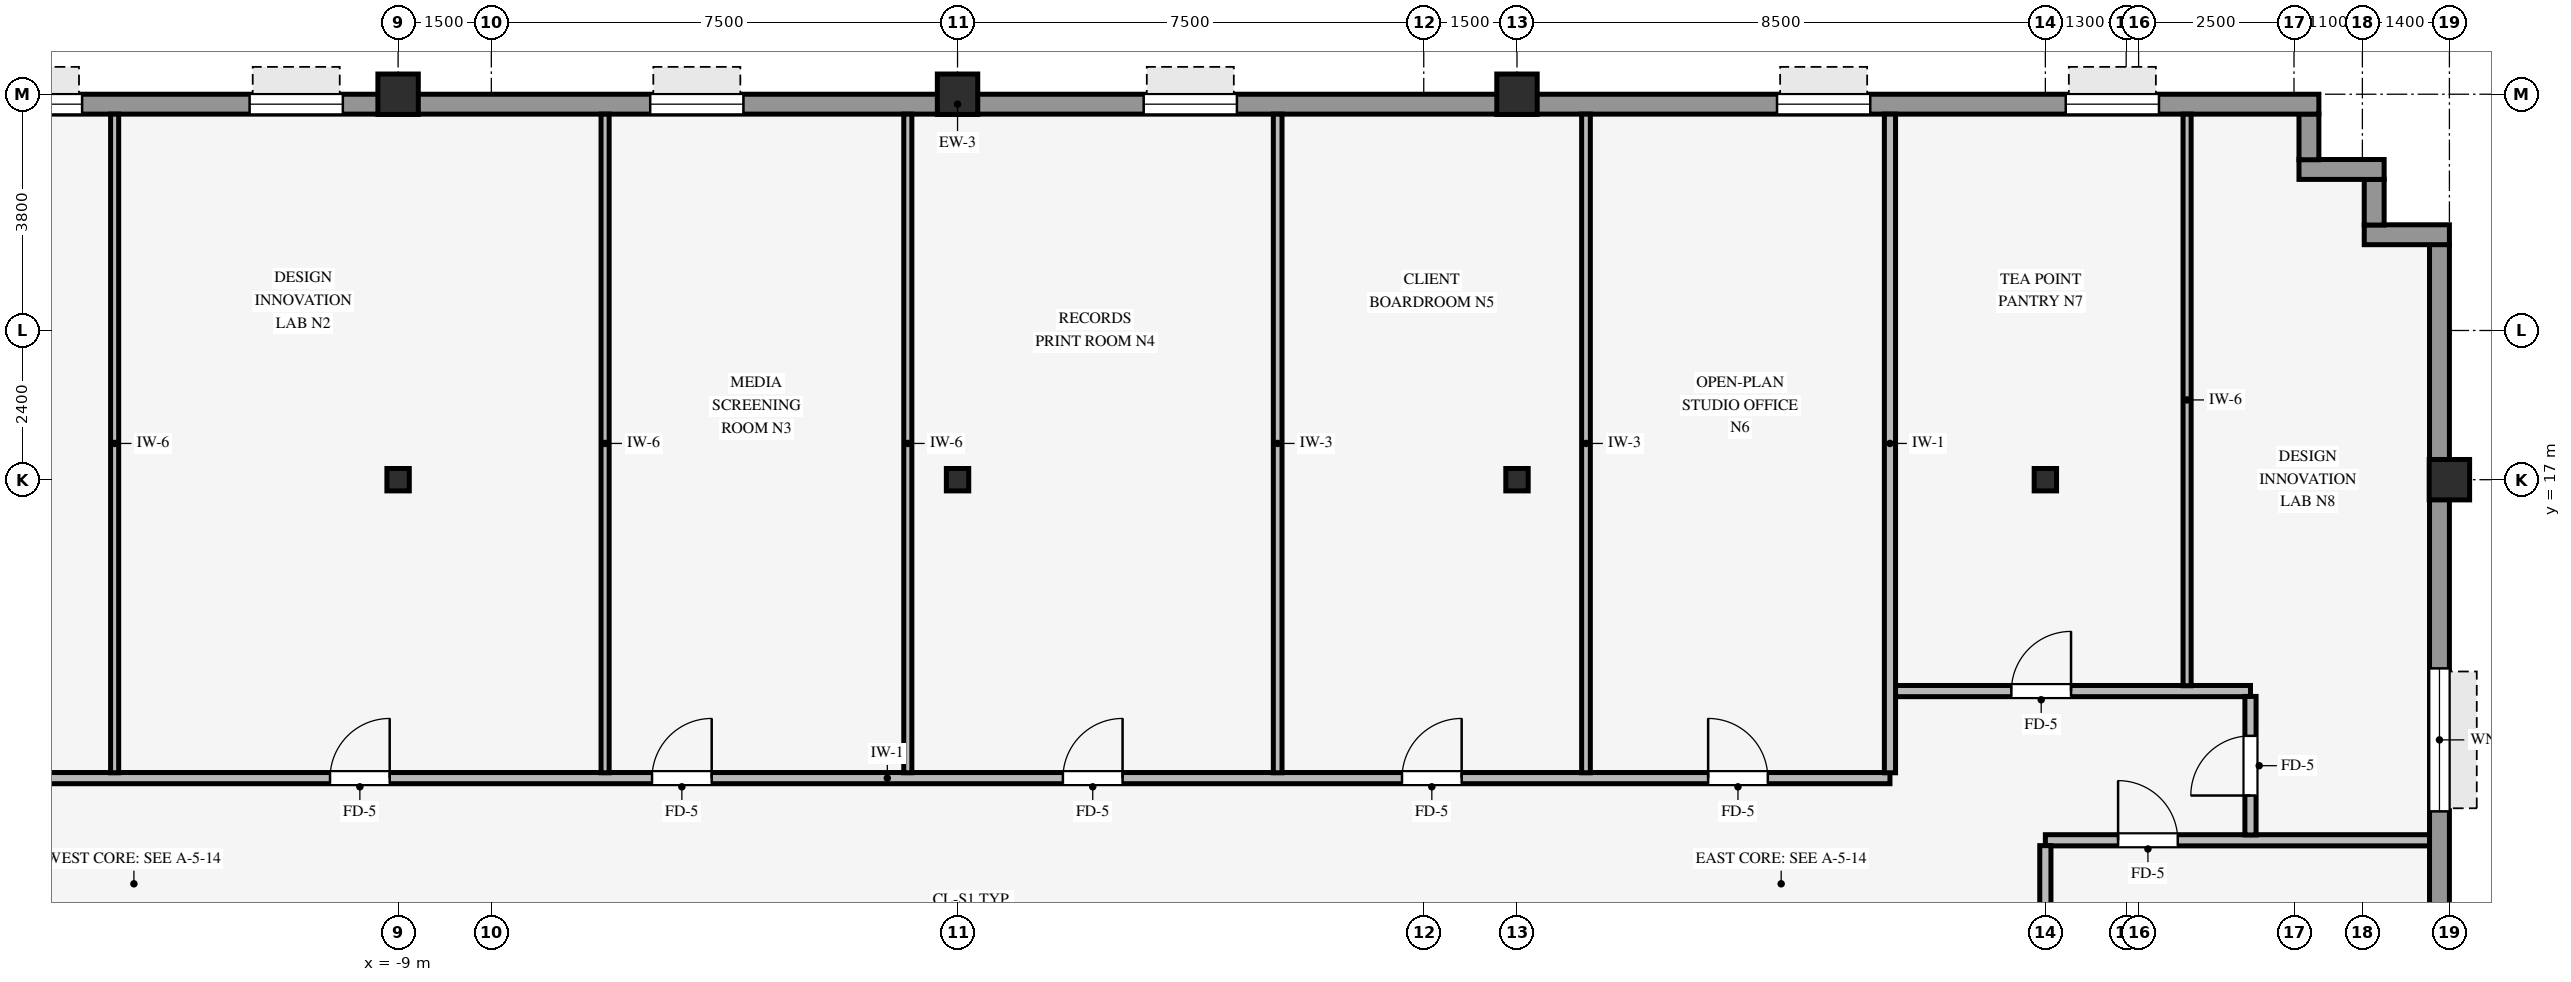
"""IFC4 building model, lengths in metres.
Left out: names, types, materials, properties, quantities, classifications, styles, units other than length and angle.
Written with IfcOpenShell. Run it as: python <this file> out.ifc"""

import sys

from ifc_helpers import new_model, si_unit, direction, frame, frame_2d, origin, origin_2d, place, context, subcontext, project, spatial, rectangle, hollow_rectangle, i_section, extrude, source, transform, mapped, element, fill, save


model = new_model("IFC4")
c1 = context("Model", 3, precision=1e-05, world=origin(), true_north=direction((0.0, 1.0)))
c2 = subcontext(c1, "Body", "Model", "MODEL_VIEW")
j1 = project(units=[si_unit("LENGTHUNIT", "METRE"), si_unit("PLANEANGLEUNIT", "RADIAN")], contexts=[c1])
p1 = place(None, origin())
s1 = spatial("IfcSite", under=j1, at=p1, CompositionType="ELEMENT")
p2 = place(p1, origin())
s2 = spatial("IfcBuilding", under=s1, at=p2, CompositionType="ELEMENT")
p3 = place(p2, frame((0.0, 0.0, 112.9)))
s3 = spatial("IfcBuildingStorey", under=s2, at=p3, CompositionType="ELEMENT", Elevation=112.9)
for number, where, z_axis, x_axis in (
    (1, (24.0, 17.0, 0.0), (0.0, 0.0, 1.0), (1.0, 0.0, 0.0)),
    (2, (-9.0, 23.2, 0.0), (0.0, 0.0, 1.0), (1.0, 0.0, 0.0)),
    (3, (0.0, 23.2, 0.0), (0.0, 0.0, 1.0), (1.0, 0.0, 0.0)),
    (4, (9.0, 23.2, 0.0), (0.0, 0.0, 1.0), (1.0, 0.0, 0.0)),
):
    element("IfcColumn", number, at=place(p3, frame(where, z_axis=z_axis, x_axis=x_axis)), inside=s3, PredefinedType="COLUMN", context=c2, shape_type="SweptSolid", body=[
        extrude(hollow_rectangle(XDim=0.65, YDim=0.65, WallThickness=0.04, InnerFilletRadius=0.04, OuterFilletRadius=0.08, at=origin_2d()), origin(), (0.0, 0.0, 1.0), 3.25),
    ])
for number, where, z_axis, x_axis in (
    (5, (0.0, 17.0, 0.0), (0.0, 0.0, 1.0), (1.0, 0.0, 0.0)),
    (6, (-9.0, 17.0, 0.0), (0.0, 0.0, 1.0), (1.0, 0.0, 0.0)),
    (7, (9.0, 17.0, 0.0), (0.0, 0.0, 1.0), (1.0, 0.0, 0.0)),
    (8, (17.5, 17.0, 0.0), (0.0, 0.0, 1.0), (1.0, 0.0, 0.0)),
):
    element("IfcColumn", number, at=place(p3, frame(where, z_axis=z_axis, x_axis=x_axis)), inside=s3, PredefinedType="COLUMN", context=c2, shape_type="SweptSolid", body=[
        extrude(i_section(OverallWidth=0.36, OverallDepth=0.36, WebThickness=0.021, FlangeThickness=0.021, FilletRadius=0.018, at=origin_2d()), origin(), (0.0, 0.0, 1.0), 3.25),
    ])
p4 = place(p3, frame((23.84, -20.784, 0.0), z_axis=(0.0, 0.0, 1.0), x_axis=(0.0, 1.0, 0.0)))
e9 = element("IfcWall", 9, at=p4, inside=s3, PredefinedType="STANDARD", context=c2, shape_type="SweptSolid", body=[
    extrude(rectangle(XDim=41.568, YDim=0.32, at=frame_2d((20.784, 0.0))), origin(), (0.0, 0.0, 1.0), 3.24),
])
p5 = place(p4, frame((6.819, 0.0, 0.8)))
e10 = element("IfcOpeningElement", 10, at=p5, cuts=e9, PredefinedType="OPENING", context=c2, shape_type="SweptSolid", body=[
    extrude(rectangle(XDim=2.3, YDim=1.62, at=frame_2d((1.15, 0.81))), frame((0.0, 0.17, 0.0), z_axis=(0.0, -1.0, 0.0), x_axis=(1.0, 0.0, 0.0)), (0.0, 0.0, 1.0), 0.34),
])
p6 = place(p4, frame((17.161, 0.0, 0.8)))
e11 = element("IfcOpeningElement", 11, at=p6, cuts=e9, PredefinedType="OPENING", context=c2, shape_type="SweptSolid", body=[
    extrude(rectangle(XDim=2.3, YDim=1.62, at=frame_2d((1.15, 0.81))), frame((0.0, 0.17, 0.0), z_axis=(0.0, -1.0, 0.0), x_axis=(1.0, 0.0, 0.0)), (0.0, 0.0, 1.0), 0.34),
])
p7 = place(p4, frame((22.107, 0.0, 0.8)))
e12 = element("IfcOpeningElement", 12, at=p7, cuts=e9, PredefinedType="OPENING", context=c2, shape_type="SweptSolid", body=[
    extrude(rectangle(XDim=2.3, YDim=1.62, at=frame_2d((1.15, 0.81))), frame((0.0, 0.17, 0.0), z_axis=(0.0, -1.0, 0.0), x_axis=(1.0, 0.0, 0.0)), (0.0, 0.0, 1.0), 0.34),
])
p8 = place(p4, frame((32.449, 0.0, 0.8)))
e13 = element("IfcOpeningElement", 13, at=p8, cuts=e9, PredefinedType="OPENING", context=c2, shape_type="SweptSolid", body=[
    extrude(rectangle(XDim=2.3, YDim=1.62, at=frame_2d((1.15, 0.81))), frame((0.0, 0.17, 0.0), z_axis=(0.0, -1.0, 0.0), x_axis=(1.0, 0.0, 0.0)), (0.0, 0.0, 1.0), 0.34),
])
p9 = place(p3, frame((22.63, 20.94, 0.0), z_axis=(0.0, 0.0, 1.0), x_axis=(1.0, 0.0, 0.0)))
e14 = element("IfcWall", 14, at=p9, inside=s3, PredefinedType="STANDARD", context=c2, shape_type="SweptSolid", body=[
    extrude(rectangle(XDim=1.37, YDim=0.32, at=frame_2d((0.685, 0.0))), origin(), (0.0, 0.0, 1.0), 3.24),
])
p10 = place(p3, frame((22.79, 21.096, 0.0), z_axis=(0.0, 0.0, 1.0), x_axis=(0.0, 1.0, 0.0)))
e15 = element("IfcWall", 15, at=p10, inside=s3, PredefinedType="STANDARD", context=c2, shape_type="SweptSolid", body=[
    extrude(rectangle(XDim=0.738, YDim=0.32, at=frame_2d((0.369, 0.0))), origin(), (0.0, 0.0, 1.0), 3.24),
])
p11 = place(p3, frame((21.58, 21.99, 0.0), z_axis=(0.0, 0.0, 1.0), x_axis=(1.0, 0.0, 0.0)))
e16 = element("IfcWall", 16, at=p11, inside=s3, PredefinedType="STANDARD", context=c2, shape_type="SweptSolid", body=[
    extrude(rectangle(XDim=1.37, YDim=0.32, at=frame_2d((0.685, 0.0))), origin(), (0.0, 0.0, 1.0), 3.24),
])
p12 = place(p3, frame((21.74, 22.146, 0.0), z_axis=(0.0, 0.0, 1.0), x_axis=(0.0, 1.0, 0.0)))
e17 = element("IfcWall", 17, at=p12, inside=s3, PredefinedType="STANDARD", context=c2, shape_type="SweptSolid", body=[
    extrude(rectangle(XDim=0.738, YDim=0.32, at=frame_2d((0.369, 0.0))), origin(), (0.0, 0.0, 1.0), 3.24),
])
p13 = place(p3, frame((-21.9, 23.04, 0.0), z_axis=(0.0, 0.0, 1.0), x_axis=(1.0, 0.0, 0.0)))
e18 = element("IfcWall", 18, at=p13, inside=s3, PredefinedType="STANDARD", context=c2, shape_type="SweptSolid", body=[
    extrude(rectangle(XDim=43.8, YDim=0.32, at=frame_2d((21.9, 0.0))), origin(), (0.0, 0.0, 1.0), 2.585),
])
p14 = place(p13, frame((2.572, 0.0, 0.8)))
e19 = element("IfcOpeningElement", 19, at=p14, cuts=e18, PredefinedType="OPENING", context=c2, shape_type="SweptSolid", body=[
    extrude(rectangle(XDim=1.5, YDim=1.6, at=frame_2d((0.75, 0.8))), frame((0.0, 0.17, 0.0), z_axis=(0.0, -1.0, 0.0), x_axis=(1.0, 0.0, 0.0)), (0.0, 0.0, 1.0), 0.34),
])
p15 = place(p13, frame((6.317, 0.0, 0.8)))
e20 = element("IfcOpeningElement", 20, at=p15, cuts=e18, PredefinedType="OPENING", context=c2, shape_type="SweptSolid", body=[
    extrude(rectangle(XDim=1.5, YDim=1.6, at=frame_2d((0.75, 0.8))), frame((0.0, 0.17, 0.0), z_axis=(0.0, -1.0, 0.0), x_axis=(1.0, 0.0, 0.0)), (0.0, 0.0, 1.0), 0.34),
])
p16 = place(p13, frame((10.511, 0.0, 0.8)))
e21 = element("IfcOpeningElement", 21, at=p16, cuts=e18, PredefinedType="OPENING", context=c2, shape_type="SweptSolid", body=[
    extrude(rectangle(XDim=1.5, YDim=1.6, at=frame_2d((0.75, 0.8))), frame((0.0, 0.17, 0.0), z_axis=(0.0, -1.0, 0.0), x_axis=(1.0, 0.0, 0.0)), (0.0, 0.0, 1.0), 0.34),
])
p17 = place(p13, frame((16.956, 0.0, 0.8)))
e22 = element("IfcOpeningElement", 22, at=p17, cuts=e18, PredefinedType="OPENING", context=c2, shape_type="SweptSolid", body=[
    extrude(rectangle(XDim=1.5, YDim=1.6, at=frame_2d((0.75, 0.8))), frame((0.0, 0.17, 0.0), z_axis=(0.0, -1.0, 0.0), x_axis=(1.0, 0.0, 0.0)), (0.0, 0.0, 1.0), 0.34),
])
p18 = place(p13, frame((24.894, 0.0, 0.8)))
e23 = element("IfcOpeningElement", 23, at=p18, cuts=e18, PredefinedType="OPENING", context=c2, shape_type="SweptSolid", body=[
    extrude(rectangle(XDim=1.5, YDim=1.6, at=frame_2d((0.75, 0.8))), frame((0.0, 0.17, 0.0), z_axis=(0.0, -1.0, 0.0), x_axis=(1.0, 0.0, 0.0)), (0.0, 0.0, 1.0), 0.34),
])
p19 = place(p13, frame((35.083, 0.0, 0.8)))
e24 = element("IfcOpeningElement", 24, at=p19, cuts=e18, PredefinedType="OPENING", context=c2, shape_type="SweptSolid", body=[
    extrude(rectangle(XDim=1.5, YDim=1.6, at=frame_2d((0.75, 0.8))), frame((0.0, 0.17, 0.0), z_axis=(0.0, -1.0, 0.0), x_axis=(1.0, 0.0, 0.0)), (0.0, 0.0, 1.0), 0.34),
])
p20 = place(p13, frame((39.728, 0.0, 0.8)))
e25 = element("IfcOpeningElement", 25, at=p20, cuts=e18, PredefinedType="OPENING", context=c2, shape_type="SweptSolid", body=[
    extrude(rectangle(XDim=1.5, YDim=1.6, at=frame_2d((0.75, 0.8))), frame((0.0, 0.17, 0.0), z_axis=(0.0, -1.0, 0.0), x_axis=(1.0, 0.0, 0.0)), (0.0, 0.0, 1.0), 0.34),
])
p21 = place(p3, frame((17.5, 11.2, 0.0), z_axis=(0.0, 0.0, 1.0), x_axis=(1.0, 0.0, 0.0)))
e26 = element("IfcWall", 26, at=p21, inside=s3, PredefinedType="PARTITIONING", context=c2, shape_type="SweptSolid", body=[
    extrude(rectangle(XDim=6.18, YDim=0.18, at=frame_2d((3.09, 0.0))), origin(), (0.0, 0.0, 1.0), 3.24),
])
p22 = place(p21, frame((1.17, 0.0, 0.0)))
e27 = element("IfcOpeningElement", 27, at=p22, cuts=e26, PredefinedType="OPENING", context=c2, shape_type="SweptSolid", body=[
    extrude(rectangle(XDim=0.96, YDim=2.1, at=frame_2d((0.48, 1.05))), frame((0.0, 0.1, 0.0), z_axis=(0.0, -1.0, 0.0), x_axis=(1.0, 0.0, 0.0)), (0.0, 0.0, 1.0), 0.2),
])
p23 = place(p3, frame((-15.0, 12.2, 0.0), z_axis=(0.0, 0.0, 1.0), x_axis=(1.0, 0.0, 0.0)))
e28 = element("IfcWall", 28, at=p23, inside=s3, PredefinedType="PARTITIONING", context=c2, shape_type="SweptSolid", body=[
    extrude(rectangle(XDim=30.0, YDim=0.18, at=frame_2d((15.0, 0.0))), origin(), (0.0, 0.0, 1.0), 3.24),
])
p24 = place(p23, frame((4.905, 0.0, 0.0)))
e29 = element("IfcOpeningElement", 29, at=p24, cuts=e28, PredefinedType="OPENING", context=c2, shape_type="SweptSolid", body=[
    extrude(rectangle(XDim=0.96, YDim=2.1, at=frame_2d((0.48, 1.05))), frame((0.0, 0.1, 0.0), z_axis=(0.0, -1.0, 0.0), x_axis=(1.0, 0.0, 0.0)), (0.0, 0.0, 1.0), 0.2),
])
p25 = place(p23, frame((16.695, 0.0, 0.0)))
e30 = element("IfcOpeningElement", 30, at=p25, cuts=e28, PredefinedType="OPENING", context=c2, shape_type="SweptSolid", body=[
    extrude(rectangle(XDim=0.96, YDim=2.1, at=frame_2d((0.48, 1.05))), frame((0.0, 0.1, 0.0), z_axis=(0.0, -1.0, 0.0), x_axis=(1.0, 0.0, 0.0)), (0.0, 0.0, 1.0), 0.2),
])
p26 = place(p23, frame((22.15, 0.0, 0.0)))
e31 = element("IfcOpeningElement", 31, at=p26, cuts=e28, PredefinedType="OPENING", context=c2, shape_type="SweptSolid", body=[
    extrude(rectangle(XDim=0.96, YDim=2.1, at=frame_2d((0.48, 1.05))), frame((0.0, 0.1, 0.0), z_axis=(0.0, -1.0, 0.0), x_axis=(1.0, 0.0, 0.0)), (0.0, 0.0, 1.0), 0.2),
])
p27 = place(p23, frame((27.075, 0.0, 0.0)))
e32 = element("IfcOpeningElement", 32, at=p27, cuts=e28, PredefinedType="OPENING", context=c2, shape_type="SweptSolid", body=[
    extrude(rectangle(XDim=0.96, YDim=2.1, at=frame_2d((0.48, 1.05))), frame((0.0, 0.1, 0.0), z_axis=(0.0, -1.0, 0.0), x_axis=(1.0, 0.0, 0.0)), (0.0, 0.0, 1.0), 0.2),
])
p28 = place(p23, frame((10.085, 0.0, 0.0)))
e33 = element("IfcOpeningElement", 33, at=p28, cuts=e28, PredefinedType="OPENING", context=c2, shape_type="SweptSolid", body=[
    extrude(rectangle(XDim=0.96, YDim=2.1, at=frame_2d((0.48, 1.05))), frame((0.0, 0.1, 0.0), z_axis=(0.0, -1.0, 0.0), x_axis=(1.0, 0.0, 0.0)), (0.0, 0.0, 1.0), 0.2),
])
p29 = place(p3, frame((15.086, 13.6, 0.0), z_axis=(0.0, 0.0, 1.0), x_axis=(1.0, 0.0, 0.0)))
e34 = element("IfcWall", 34, at=p29, inside=s3, PredefinedType="PARTITIONING", context=c2, shape_type="SweptSolid", body=[
    extrude(rectangle(XDim=5.714, YDim=0.18, at=frame_2d((2.857, 0.0))), origin(), (0.0, 0.0, 1.0), 2.878),
])
p30 = place(p29, frame((1.867, 0.0, 0.0)))
e35 = element("IfcOpeningElement", 35, at=p30, cuts=e34, PredefinedType="OPENING", context=c2, shape_type="SweptSolid", body=[
    extrude(rectangle(XDim=0.96, YDim=2.1, at=frame_2d((0.48, 1.05))), frame((0.0, 0.1, 0.0), z_axis=(0.0, -1.0, 0.0), x_axis=(1.0, 0.0, 0.0)), (0.0, 0.0, 1.0), 0.2),
])
for number, where, z_axis, x_axis in (
    (36, (-13.56, 12.286, 0.0), (0.0, 0.0, 1.0), (0.0, 1.0, 0.0)),
    (37, (-5.67, 12.286, 0.0), (0.0, 0.0, 1.0), (0.0, 1.0, 0.0)),
    (38, (-0.8, 12.286, 0.0), (0.0, 0.0, 1.0), (0.0, 1.0, 0.0)),
):
    element("IfcWall", number, at=place(p3, frame(where, z_axis=z_axis, x_axis=x_axis)), inside=s3, PredefinedType="PARTITIONING", context=c2, shape_type="SweptSolid", body=[
        extrude(rectangle(XDim=10.594, YDim=0.13, at=frame_2d((5.297, 0.0))), origin(), (0.0, 0.0, 1.0), 3.24),
    ])
for number, where, z_axis, x_axis in (
    (39, (5.15, 12.286, 0.0), (0.0, 0.0, 1.0), (0.0, 1.0, 0.0)),
    (40, (10.11, 12.286, 0.0), (0.0, 0.0, 1.0), (0.0, 1.0, 0.0)),
):
    element("IfcWall", number, at=place(p3, frame(where, z_axis=z_axis, x_axis=x_axis)), inside=s3, PredefinedType="PARTITIONING", context=c2, shape_type="SweptSolid", body=[
        extrude(rectangle(XDim=10.594, YDim=0.14, at=frame_2d((5.297, 0.0))), origin(), (0.0, 0.0, 1.0), 3.24),
    ])
p31 = place(p3, frame((15.0, 12.286, 0.0), z_axis=(0.0, 0.0, 1.0), x_axis=(0.0, 1.0, 0.0)))
e41 = element("IfcWall", 41, at=p31, inside=s3, PredefinedType="PARTITIONING", context=c2, shape_type="SweptSolid", body=[
    extrude(rectangle(XDim=10.594, YDim=0.18, at=frame_2d((5.297, 0.0))), origin(), (0.0, 0.0, 1.0), 3.24),
])
p32 = place(p3, frame((17.5, 10.146, 0.0), z_axis=(0.0, 0.0, 1.0), x_axis=(0.0, 1.0, 0.0)))
e42 = element("IfcWall", 42, at=p32, inside=s3, PredefinedType="PARTITIONING", context=c2, shape_type="SweptSolid", body=[
    extrude(rectangle(XDim=0.968, YDim=0.18, at=frame_2d((0.484, 0.0))), origin(), (0.0, 0.0, 1.0), 2.618),
])
p33 = place(p3, frame((19.78, 13.686, 0.0), z_axis=(0.0, 0.0, 1.0), x_axis=(0.0, 1.0, 0.0)))
e43 = element("IfcWall", 43, at=p33, inside=s3, PredefinedType="PARTITIONING", context=c2, shape_type="SweptSolid", body=[
    extrude(rectangle(XDim=9.194, YDim=0.13, at=frame_2d((4.597, 0.0))), origin(), (0.0, 0.0, 1.0), 3.24),
])
p34 = place(p3, frame((20.8, 11.286, 0.0), z_axis=(0.0, 0.0, 1.0), x_axis=(0.0, 1.0, 0.0)))
e44 = element("IfcWall", 44, at=p34, inside=s3, PredefinedType="PARTITIONING", context=c2, shape_type="SweptSolid", body=[
    extrude(rectangle(XDim=2.228, YDim=0.18, at=frame_2d((1.114, 0.0))), origin(), (0.0, 0.0, 1.0), 3.24),
])
p35 = place(p34, frame((0.634, 0.0, 0.0)))
e45 = element("IfcOpeningElement", 45, at=p35, cuts=e44, PredefinedType="OPENING", context=c2, shape_type="SweptSolid", body=[
    extrude(rectangle(XDim=0.96, YDim=2.1, at=frame_2d((0.48, 1.05))), frame((0.0, 0.1, 0.0), z_axis=(0.0, -1.0, 0.0), x_axis=(1.0, 0.0, 0.0)), (0.0, 0.0, 1.0), 0.2),
])
m1 = source(origin(), c2, "Body", "SweptSolid", [
    extrude(rectangle(XDim=2.3, YDim=1.62, at=frame_2d((1.15, 0.81))), frame((0.0, 0.03, 0.0), z_axis=(0.0, -1.0, 0.0), x_axis=(1.0, 0.0, 0.0)), (0.0, 0.0, 1.0), 0.06),
])
p36 = place(p8, origin())
e46 = element("IfcWindow", 46, at=p36, inside=s3, PartitioningType="SINGLE_PANEL", PredefinedType="WINDOW", context=c2, shape_type="MappedRepresentation", body=[
    mapped(m1, transform((0.0, 0.0, 0.0), scale=1.0)),
])
fill(e13, e46)
m2 = source(origin(), c2, "Body", "SweptSolid", [
    extrude(rectangle(XDim=1.5, YDim=1.6, at=frame_2d((0.75, 0.8))), frame((0.0, 0.03, 0.0), z_axis=(0.0, -1.0, 0.0), x_axis=(1.0, 0.0, 0.0)), (0.0, 0.0, 1.0), 0.06),
])
p37 = place(p15, origin())
e47 = element("IfcWindow", 47, at=p37, inside=s3, PartitioningType="SINGLE_PANEL", PredefinedType="WINDOW", context=c2, shape_type="MappedRepresentation", body=[
    mapped(m2, transform((0.0, 0.0, 0.0), scale=1.0)),
])
fill(e20, e47)
p38 = place(p16, origin())
e48 = element("IfcWindow", 48, at=p38, inside=s3, PartitioningType="SINGLE_PANEL", PredefinedType="WINDOW", context=c2, shape_type="MappedRepresentation", body=[
    mapped(m2, transform((0.0, 0.0, 0.0), scale=1.0)),
])
fill(e21, e48)
p39 = place(p17, origin())
e49 = element("IfcWindow", 49, at=p39, inside=s3, PartitioningType="SINGLE_PANEL", PredefinedType="WINDOW", context=c2, shape_type="MappedRepresentation", body=[
    mapped(m2, transform((0.0, 0.0, 0.0), scale=1.0)),
])
fill(e22, e49)
p40 = place(p18, origin())
e50 = element("IfcWindow", 50, at=p40, inside=s3, PartitioningType="SINGLE_PANEL", PredefinedType="WINDOW", context=c2, shape_type="MappedRepresentation", body=[
    mapped(m2, transform((0.0, 0.0, 0.0), scale=1.0)),
])
fill(e23, e50)
p41 = place(p19, origin())
e51 = element("IfcWindow", 51, at=p41, inside=s3, PartitioningType="SINGLE_PANEL", PredefinedType="WINDOW", context=c2, shape_type="MappedRepresentation", body=[
    mapped(m2, transform((0.0, 0.0, 0.0), scale=1.0)),
])
fill(e24, e51)
p42 = place(p20, origin())
e52 = element("IfcWindow", 52, at=p42, inside=s3, PartitioningType="SINGLE_PANEL", PredefinedType="WINDOW", context=c2, shape_type="MappedRepresentation", body=[
    mapped(m2, transform((0.0, 0.0, 0.0), scale=1.0)),
])
fill(e25, e52)
m3 = source(origin(), c2, "Body", "SweptSolid", [
    extrude(rectangle(XDim=0.96, YDim=2.1, at=frame_2d((0.48, 1.05))), frame((0.0, 0.025, 0.0), z_axis=(0.0, -1.0, 0.0), x_axis=(1.0, 0.0, 0.0)), (0.0, 0.0, 1.0), 0.05),
])
p43 = place(p24, origin())
e53 = element("IfcDoor", 53, at=p43, inside=s3, OperationType="SINGLE_SWING_RIGHT", PredefinedType="DOOR", context=c2, shape_type="MappedRepresentation", body=[
    mapped(m3, transform((0.0, 0.0, 0.0), scale=1.0)),
])
fill(e29, e53)
p44 = place(p25, origin())
e54 = element("IfcDoor", 54, at=p44, inside=s3, OperationType="SINGLE_SWING_RIGHT", PredefinedType="DOOR", context=c2, shape_type="MappedRepresentation", body=[
    mapped(m3, transform((0.0, 0.0, 0.0), scale=1.0)),
])
fill(e30, e54)
p45 = place(p26, origin())
e55 = element("IfcDoor", 55, at=p45, inside=s3, OperationType="SINGLE_SWING_RIGHT", PredefinedType="DOOR", context=c2, shape_type="MappedRepresentation", body=[
    mapped(m3, transform((0.0, 0.0, 0.0), scale=1.0)),
])
fill(e31, e55)
p46 = place(p27, origin())
e56 = element("IfcDoor", 56, at=p46, inside=s3, OperationType="SINGLE_SWING_LEFT", PredefinedType="DOOR", context=c2, shape_type="MappedRepresentation", body=[
    mapped(m3, transform((0.0, 0.0, 0.0), scale=1.0)),
])
fill(e32, e56)
p47 = place(p30, origin())
e57 = element("IfcDoor", 57, at=p47, inside=s3, OperationType="SINGLE_SWING_RIGHT", PredefinedType="DOOR", context=c2, shape_type="MappedRepresentation", body=[
    mapped(m3, transform((0.0, 0.0, 0.0), scale=1.0)),
])
fill(e35, e57)
p48 = place(p22, origin())
e58 = element("IfcDoor", 58, at=p48, inside=s3, OperationType="SINGLE_SWING_LEFT", PredefinedType="DOOR", context=c2, shape_type="MappedRepresentation", body=[
    mapped(m3, transform((0.0, 0.0, 0.0), scale=1.0)),
])
fill(e27, e58)
p49 = place(p28, origin())
e59 = element("IfcDoor", 59, at=p49, inside=s3, OperationType="SINGLE_SWING_RIGHT", PredefinedType="DOOR", context=c2, shape_type="MappedRepresentation", body=[
    mapped(m3, transform((0.0, 0.0, 0.0), scale=1.0)),
])
fill(e33, e59)
p50 = place(p35, origin())
e60 = element("IfcDoor", 60, at=p50, inside=s3, OperationType="SINGLE_SWING_LEFT", PredefinedType="DOOR", context=c2, shape_type="MappedRepresentation", body=[
    mapped(m3, transform((0.0, 0.0, 0.0), scale=1.0)),
])
fill(e45, e60)
save(model, sys.argv[1])
